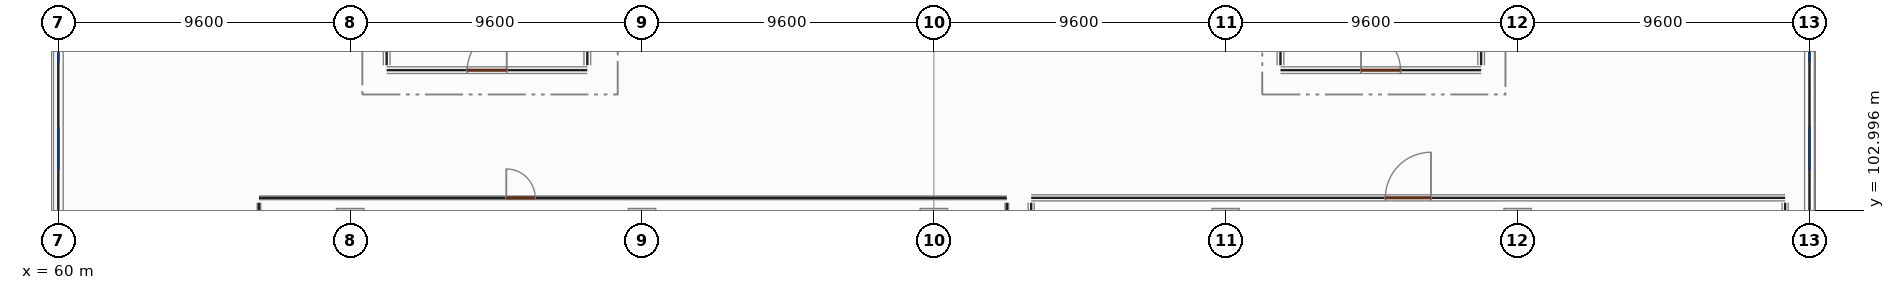
"""IFC4 building model, lengths in metres.
Left out: names, types, materials, properties, quantities, classifications, styles, units other than length and angle.
Written with IfcOpenShell. Run it as: python <this file> out.ifc"""

import sys

from ifc_helpers import new_model, si_unit, direction, frame, frame_2d, origin, origin_2d, place, context, subcontext, project, spatial, rectangle, extrude, element, fill, save


model = new_model("IFC4")
c1 = context("Model", 3, precision=1e-05, world=origin(), true_north=direction((0.0, 1.0)))
c2 = subcontext(c1, "Body", "Model", "MODEL_VIEW")
j1 = project(units=[si_unit("LENGTHUNIT", "METRE"), si_unit("PLANEANGLEUNIT", "RADIAN")], contexts=[c1])
p1 = place(None, origin())
s1 = spatial("IfcSite", under=j1, at=p1, CompositionType="ELEMENT")
p2 = place(p1, origin())
s2 = spatial("IfcBuilding", under=s1, at=p2, CompositionType="ELEMENT")
p3 = place(p2, frame((0.0, 0.0, 5.4)))
s3 = spatial("IfcBuildingStorey", under=s2, at=p3, CompositionType="ELEMENT", Elevation=5.4)
for number, where, z_axis, x_axis in (
    (1, (69.6, 102.6, 0.0), (0.0, 0.0, 1.0), (1.0, 0.0, 0.0)),
    (2, (79.2, 102.6, 0.0), (0.0, 0.0, 1.0), (1.0, 0.0, 0.0)),
    (3, (88.8, 102.6, 0.0), (0.0, 0.0, 1.0), (1.0, 0.0, 0.0)),
    (4, (98.4, 102.6, 0.0), (0.0, 0.0, 1.0), (1.0, 0.0, 0.0)),
    (5, (108.0, 102.6, 0.0), (0.0, 0.0, 1.0), (1.0, 0.0, 0.0)),
):
    element("IfcColumn", number, at=place(p3, frame(where, z_axis=z_axis, x_axis=x_axis)), inside=s3, PredefinedType="COLUMN", context=c2, shape_type="SweptSolid", body=[
        extrude(rectangle(XDim=0.9, YDim=0.9, at=origin_2d()), origin(), (0.0, 0.0, 1.0), 4.18),
    ])
p4 = place(p3, frame((60.0, 102.952, 0.0), z_axis=(0.0, 0.0, 1.0), x_axis=(0.0, 1.0, 0.0)))
e6 = element("IfcWall", 6, at=p4, inside=s3, PredefinedType="SOLIDWALL", context=c2, shape_type="SweptSolid", body=[
    extrude(rectangle(XDim=7.696, YDim=0.32, at=frame_2d((3.848, 0.0))), origin(), (0.0, 0.0, 1.0), 3.38),
])
p5 = place(p4, frame((1.378, 0.0, 0.85)))
e7 = element("IfcOpeningElement", 7, at=p5, cuts=e6, PredefinedType="OPENING", context=c2, shape_type="SweptSolid", body=[
    extrude(rectangle(XDim=1.4, YDim=1.65, at=frame_2d((0.7, 0.825))), frame((0.0, 0.17, 0.0), z_axis=(0.0, -1.0, 0.0), x_axis=(1.0, 0.0, 0.0)), (0.0, 0.0, 1.0), 0.34),
])
p6 = place(p4, frame((4.918, 0.0, 0.85)))
e8 = element("IfcOpeningElement", 8, at=p6, cuts=e6, PredefinedType="OPENING", context=c2, shape_type="SweptSolid", body=[
    extrude(rectangle(XDim=1.4, YDim=1.65, at=frame_2d((0.7, 0.825))), frame((0.0, 0.17, 0.0), z_axis=(0.0, -1.0, 0.0), x_axis=(1.0, 0.0, 0.0)), (0.0, 0.0, 1.0), 0.34),
])
p7 = place(p3, frame((117.6, 102.952, 0.0), z_axis=(0.0, 0.0, 1.0), x_axis=(0.0, 1.0, 0.0)))
e9 = element("IfcWall", 9, at=p7, inside=s3, PredefinedType="SOLIDWALL", context=c2, shape_type="SweptSolid", body=[
    extrude(rectangle(XDim=7.696, YDim=0.32, at=frame_2d((3.848, 0.0))), origin(), (0.0, 0.0, 1.0), 3.38),
])
p8 = place(p7, frame((1.378, 0.0, 0.85)))
e10 = element("IfcOpeningElement", 10, at=p8, cuts=e9, PredefinedType="OPENING", context=c2, shape_type="SweptSolid", body=[
    extrude(rectangle(XDim=1.4, YDim=1.65, at=frame_2d((0.7, 0.825))), frame((0.0, 0.17, 0.0), z_axis=(0.0, -1.0, 0.0), x_axis=(1.0, 0.0, 0.0)), (0.0, 0.0, 1.0), 0.34),
])
p9 = place(p7, frame((4.918, 0.0, 0.85)))
e11 = element("IfcOpeningElement", 11, at=p9, cuts=e9, PredefinedType="OPENING", context=c2, shape_type="SweptSolid", body=[
    extrude(rectangle(XDim=1.4, YDim=1.65, at=frame_2d((0.7, 0.825))), frame((0.0, 0.17, 0.0), z_axis=(0.0, -1.0, 0.0), x_axis=(1.0, 0.0, 0.0)), (0.0, 0.0, 1.0), 0.34),
])
p10 = place(p3, frame((70.8, 107.6, 0.0), z_axis=(0.0, 0.0, 1.0), x_axis=(1.0, 0.0, 0.0)))
e12 = element("IfcWall", 12, at=p10, inside=s3, PredefinedType="PARTITIONING", context=c2, shape_type="SweptSolid", body=[
    extrude(rectangle(XDim=6.6, YDim=0.22, at=frame_2d((3.3, 0.0))), origin(), (0.0, 0.0, 1.0), 3.22),
])
p11 = place(p10, frame((2.65, 0.0, 0.0)))
e13 = element("IfcOpeningElement", 13, at=p11, cuts=e12, PredefinedType="OPENING", context=c2, shape_type="SweptSolid", body=[
    extrude(rectangle(XDim=1.3, YDim=2.2, at=frame_2d((0.65, 1.1))), frame((0.0, 0.12, 0.0), z_axis=(0.0, -1.0, 0.0), x_axis=(1.0, 0.0, 0.0)), (0.0, 0.0, 1.0), 0.24),
])
for number, where, z_axis, x_axis in (
    (14, (70.8, 107.76, 0.0), (0.0, 0.0, 1.0), (0.0, 1.0, 0.0)),
    (15, (77.4, 107.76, 0.0), (0.0, 0.0, 1.0), (0.0, 1.0, 0.0)),
):
    element("IfcWall", number, at=place(p3, frame(where, z_axis=z_axis, x_axis=x_axis)), inside=s3, PredefinedType="PARTITIONING", context=c2, shape_type="SweptSolid", body=[
        extrude(rectangle(XDim=3.08, YDim=0.22, at=frame_2d((1.54, 0.0))), origin(), (0.0, 0.0, 1.0), 3.22),
    ])
p12 = place(p3, frame((100.2, 107.6, 0.0), z_axis=(0.0, 0.0, 1.0), x_axis=(1.0, 0.0, 0.0)))
e16 = element("IfcWall", 16, at=p12, inside=s3, PredefinedType="PARTITIONING", context=c2, shape_type="SweptSolid", body=[
    extrude(rectangle(XDim=6.6, YDim=0.22, at=frame_2d((3.3, 0.0))), origin(), (0.0, 0.0, 1.0), 3.22),
])
p13 = place(p12, frame((2.65, 0.0, 0.0)))
e17 = element("IfcOpeningElement", 17, at=p13, cuts=e16, PredefinedType="OPENING", context=c2, shape_type="SweptSolid", body=[
    extrude(rectangle(XDim=1.3, YDim=2.2, at=frame_2d((0.65, 1.1))), frame((0.0, 0.12, 0.0), z_axis=(0.0, -1.0, 0.0), x_axis=(1.0, 0.0, 0.0)), (0.0, 0.0, 1.0), 0.24),
])
for number, where, z_axis, x_axis in (
    (18, (100.2, 107.76, 0.0), (0.0, 0.0, 1.0), (0.0, 1.0, 0.0)),
    (19, (106.8, 107.76, 0.0), (0.0, 0.0, 1.0), (0.0, 1.0, 0.0)),
):
    element("IfcWall", number, at=place(p3, frame(where, z_axis=z_axis, x_axis=x_axis)), inside=s3, PredefinedType="PARTITIONING", context=c2, shape_type="SweptSolid", body=[
        extrude(rectangle(XDim=3.08, YDim=0.22, at=frame_2d((1.54, 0.0))), origin(), (0.0, 0.0, 1.0), 3.22),
    ])
p14 = place(p3, frame((66.6, 103.4, 0.0), z_axis=(0.0, 0.0, 1.0), x_axis=(1.0, 0.0, 0.0)))
e20 = element("IfcWall", 20, at=p14, inside=s3, PredefinedType="PARTITIONING", context=c2, shape_type="SweptSolid", body=[
    extrude(rectangle(XDim=24.6, YDim=0.12, at=frame_2d((12.3, 0.0))), origin(), (0.0, 0.0, 1.0), 3.22),
])
p15 = place(p14, frame((8.135, 0.0, 0.0)))
e21 = element("IfcOpeningElement", 21, at=p15, cuts=e20, PredefinedType="OPENING", context=c2, shape_type="SweptSolid", body=[
    extrude(rectangle(XDim=0.95, YDim=2.15, at=frame_2d((0.475, 1.075))), frame((0.0, 0.07, 0.0), z_axis=(0.0, -1.0, 0.0), x_axis=(1.0, 0.0, 0.0)), (0.0, 0.0, 1.0), 0.14),
])
for number, where, z_axis, x_axis in (
    (22, (66.6, 87.76, 0.0), (0.0, 0.0, 1.0), (0.0, 1.0, 0.0)),
    (23, (91.2, 87.76, 0.0), (0.0, 0.0, 1.0), (0.0, 1.0, 0.0)),
):
    element("IfcWall", number, at=place(p3, frame(where, z_axis=z_axis, x_axis=x_axis)), inside=s3, PredefinedType="PARTITIONING", context=c2, shape_type="SweptSolid", body=[
        extrude(rectangle(XDim=15.48, YDim=0.12, at=frame_2d((7.74, 0.0))), origin(), (0.0, 0.0, 1.0), 3.22),
    ])
p16 = place(p3, frame((92.0, 103.4, 0.0), z_axis=(0.0, 0.0, 1.0), x_axis=(1.0, 0.0, 0.0)))
e24 = element("IfcWall", 24, at=p16, inside=s3, PredefinedType="PARTITIONING", context=c2, shape_type="SweptSolid", body=[
    extrude(rectangle(XDim=24.8, YDim=0.2, at=frame_2d((12.4, 0.0))), origin(), (0.0, 0.0, 1.0), 3.22),
])
p17 = place(p16, frame((11.65, 0.0, 0.0)))
e25 = element("IfcOpeningElement", 25, at=p17, cuts=e24, PredefinedType="OPENING", context=c2, shape_type="SweptSolid", body=[
    extrude(rectangle(XDim=1.5, YDim=2.2, at=frame_2d((0.75, 1.1))), frame((0.0, 0.11, 0.0), z_axis=(0.0, -1.0, 0.0), x_axis=(1.0, 0.0, 0.0)), (0.0, 0.0, 1.0), 0.22),
])
for number, where, z_axis, x_axis in (
    (26, (92.0, 87.76, 0.0), (0.0, 0.0, 1.0), (0.0, 1.0, 0.0)),
    (27, (116.8, 87.76, 0.0), (0.0, 0.0, 1.0), (0.0, 1.0, 0.0)),
):
    element("IfcWall", number, at=place(p3, frame(where, z_axis=z_axis, x_axis=x_axis)), inside=s3, PredefinedType="PARTITIONING", context=c2, shape_type="SweptSolid", body=[
        extrude(rectangle(XDim=15.48, YDim=0.2, at=frame_2d((7.74, 0.0))), origin(), (0.0, 0.0, 1.0), 3.22),
    ])
p18 = place(p5, origin())
e28 = element("IfcWindow", 28, at=p18, inside=s3, PartitioningType="SINGLE_PANEL", PredefinedType="WINDOW", context=c2, shape_type="SweptSolid", body=[
    extrude(rectangle(XDim=1.4, YDim=1.65, at=frame_2d((0.7, 0.825))), frame((0.0, 0.03, 0.0), z_axis=(0.0, -1.0, 0.0), x_axis=(1.0, 0.0, 0.0)), (0.0, 0.0, 1.0), 0.06),
])
fill(e7, e28)
p19 = place(p6, origin())
e29 = element("IfcWindow", 29, at=p19, inside=s3, PartitioningType="SINGLE_PANEL", PredefinedType="WINDOW", context=c2, shape_type="SweptSolid", body=[
    extrude(rectangle(XDim=1.4, YDim=1.65, at=frame_2d((0.7, 0.825))), frame((0.0, 0.03, 0.0), z_axis=(0.0, -1.0, 0.0), x_axis=(1.0, 0.0, 0.0)), (0.0, 0.0, 1.0), 0.06),
])
fill(e8, e29)
p20 = place(p8, origin())
e30 = element("IfcWindow", 30, at=p20, inside=s3, PartitioningType="SINGLE_PANEL", PredefinedType="WINDOW", context=c2, shape_type="SweptSolid", body=[
    extrude(rectangle(XDim=1.4, YDim=1.65, at=frame_2d((0.7, 0.825))), frame((0.0, 0.03, 0.0), z_axis=(0.0, -1.0, 0.0), x_axis=(1.0, 0.0, 0.0)), (0.0, 0.0, 1.0), 0.06),
])
fill(e10, e30)
p21 = place(p9, origin())
e31 = element("IfcWindow", 31, at=p21, inside=s3, PartitioningType="SINGLE_PANEL", PredefinedType="WINDOW", context=c2, shape_type="SweptSolid", body=[
    extrude(rectangle(XDim=1.4, YDim=1.65, at=frame_2d((0.7, 0.825))), frame((0.0, 0.03, 0.0), z_axis=(0.0, -1.0, 0.0), x_axis=(1.0, 0.0, 0.0)), (0.0, 0.0, 1.0), 0.06),
])
fill(e11, e31)
p22 = place(p11, origin())
e32 = element("IfcDoor", 32, at=p22, inside=s3, OperationType="SINGLE_SWING_RIGHT", PredefinedType="DOOR", context=c2, shape_type="SweptSolid", body=[
    extrude(rectangle(XDim=1.3, YDim=2.2, at=frame_2d((0.65, 1.1))), frame((0.0, 0.025, 0.0), z_axis=(0.0, -1.0, 0.0), x_axis=(1.0, 0.0, 0.0)), (0.0, 0.0, 1.0), 0.05),
])
fill(e13, e32)
p23 = place(p13, origin())
e33 = element("IfcDoor", 33, at=p23, inside=s3, OperationType="SINGLE_SWING_LEFT", PredefinedType="DOOR", context=c2, shape_type="SweptSolid", body=[
    extrude(rectangle(XDim=1.3, YDim=2.2, at=frame_2d((0.65, 1.1))), frame((0.0, 0.025, 0.0), z_axis=(0.0, -1.0, 0.0), x_axis=(1.0, 0.0, 0.0)), (0.0, 0.0, 1.0), 0.05),
])
fill(e17, e33)
p24 = place(p15, origin())
e34 = element("IfcDoor", 34, at=p24, inside=s3, OperationType="SINGLE_SWING_LEFT", PredefinedType="DOOR", context=c2, shape_type="SweptSolid", body=[
    extrude(rectangle(XDim=0.95, YDim=2.15, at=frame_2d((0.475, 1.075))), frame((0.0, 0.025, 0.0), z_axis=(0.0, -1.0, 0.0), x_axis=(1.0, 0.0, 0.0)), (0.0, 0.0, 1.0), 0.05),
])
fill(e21, e34)
p25 = place(p17, origin())
e35 = element("IfcDoor", 35, at=p25, inside=s3, OperationType="SINGLE_SWING_RIGHT", PredefinedType="DOOR", context=c2, shape_type="SweptSolid", body=[
    extrude(rectangle(XDim=1.5, YDim=2.2, at=frame_2d((0.75, 1.1))), frame((0.0, 0.025, 0.0), z_axis=(0.0, -1.0, 0.0), x_axis=(1.0, 0.0, 0.0)), (0.0, 0.0, 1.0), 0.05),
])
fill(e25, e35)
save(model, sys.argv[1])
